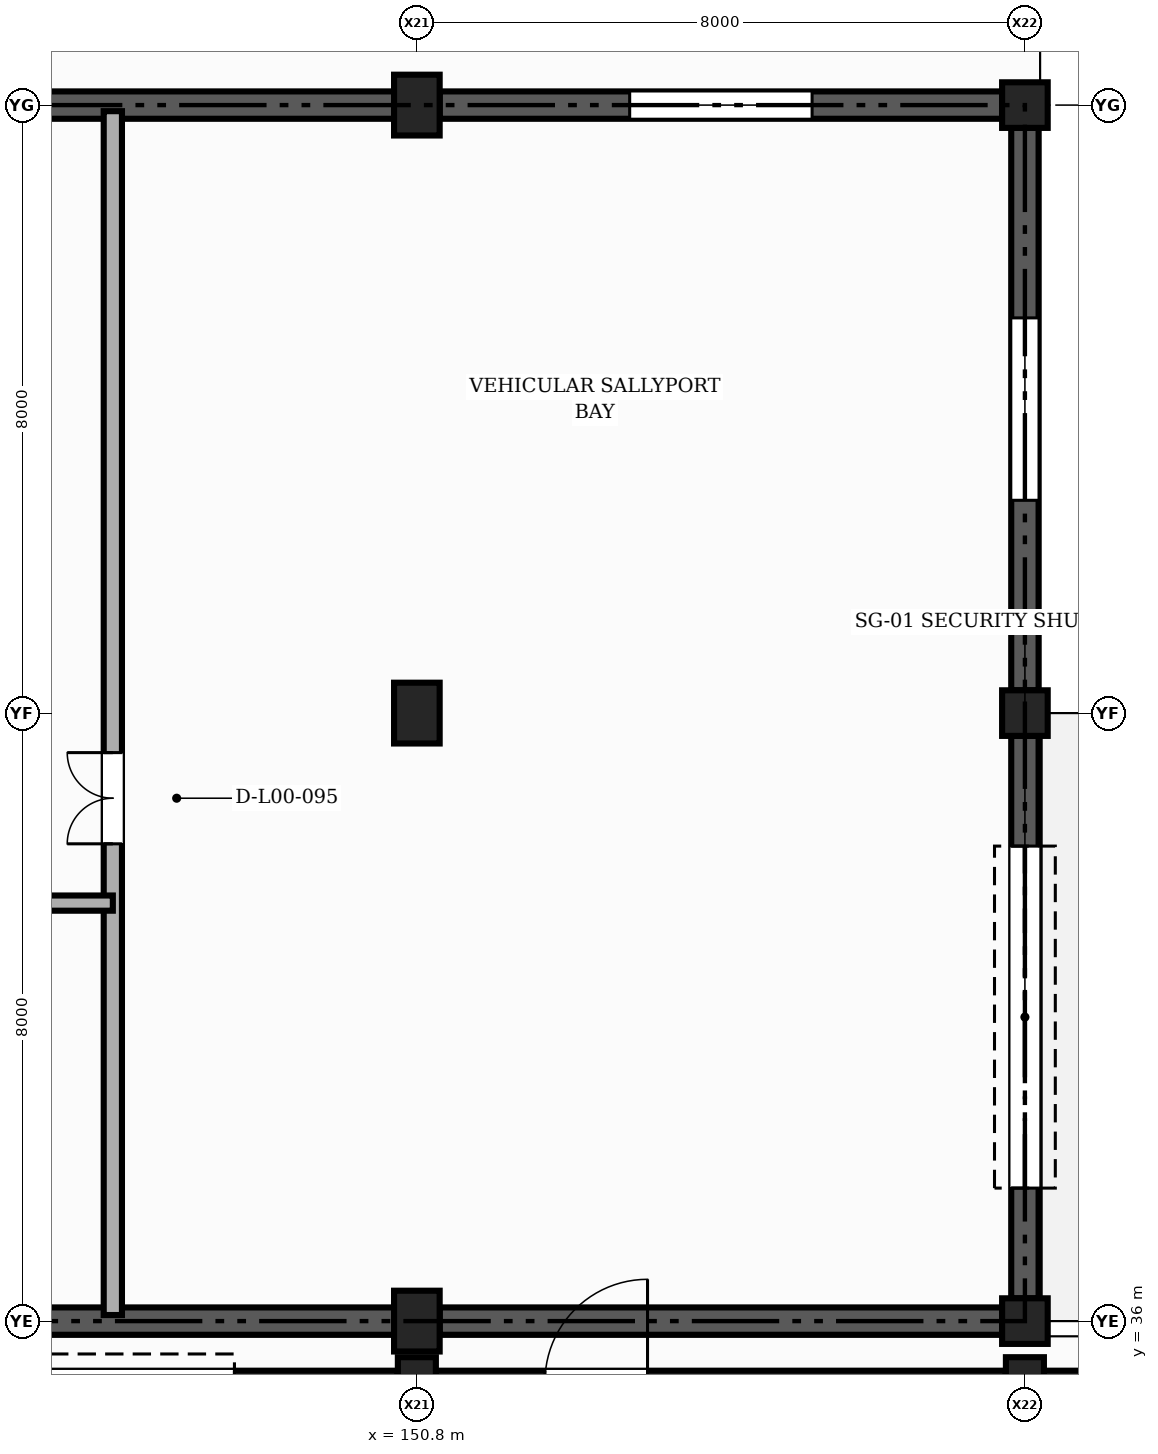
"""IFC4 building model, lengths in metres.
Left out: names, types, materials, properties, quantities, classifications, styles, units other than length and angle.
Written with IfcOpenShell. Run it as: python <this file> out.ifc"""

import sys

from ifc_helpers import new_model, si_unit, direction, frame, frame_2d, origin, origin_2d, place, context, subcontext, project, spatial, rectangle, extrude, element, fill, save


model = new_model("IFC4")
c1 = context("Model", 3, precision=1e-05, world=origin(), true_north=direction((0.0, 1.0)))
c2 = subcontext(c1, "Body", "Model", "MODEL_VIEW")
j1 = project(units=[si_unit("LENGTHUNIT", "METRE"), si_unit("PLANEANGLEUNIT", "RADIAN")], contexts=[c1])
p1 = place(None, origin())
s1 = spatial("IfcSite", under=j1, at=p1, CompositionType="ELEMENT")
p2 = place(p1, origin())
s2 = spatial("IfcBuilding", under=s1, at=p2, CompositionType="ELEMENT")
p3 = place(p2, origin())
s3 = spatial("IfcBuildingStorey", under=s2, at=p3, CompositionType="ELEMENT", Elevation=0.0)
p4 = place(p3, frame((150.8, 35.2, -0.5), z_axis=(0.0, 0.0, 1.0), x_axis=(1.0, 0.0, 0.0)))
e1 = element("IfcColumn", 1, at=p4, inside=s3, PredefinedType="COLUMN", context=c2, shape_type="SweptSolid", body=[
    extrude(rectangle(XDim=0.5, YDim=0.65, at=origin_2d()), origin(), (0.0, 0.0, 1.0), 5.3),
])
for number, where, z_axis, x_axis in (
    (2, (150.8, 36.0, -0.5), (0.0, 0.0, 1.0), (1.0, 0.0, 0.0)),
    (3, (150.8, 44.0, -0.5), (0.0, 0.0, 1.0), (1.0, 0.0, 0.0)),
    (4, (150.8, 52.0, -0.5), (0.0, 0.0, 1.0), (1.0, 0.0, 0.0)),
):
    element("IfcColumn", number, at=place(p3, frame(where, z_axis=z_axis, x_axis=x_axis)), inside=s3, PredefinedType="COLUMN", context=c2, shape_type="SweptSolid", body=[
        extrude(rectangle(XDim=0.6, YDim=0.8, at=origin_2d()), origin(), (0.0, 0.0, 1.0), 5.3),
    ])
p5 = place(p3, frame((158.8, 35.2, -0.5), z_axis=(0.0, 0.0, 1.0), x_axis=(1.0, 0.0, 0.0)))
e5 = element("IfcColumn", 5, at=p5, inside=s3, PredefinedType="COLUMN", context=c2, shape_type="SweptSolid", body=[
    extrude(rectangle(XDim=0.5, YDim=0.65, at=origin_2d()), origin(), (0.0, 0.0, 1.0), 5.3),
])
for number, where, z_axis, x_axis in (
    (6, (158.8, 36.0, -0.5), (0.0, 0.0, 1.0), (1.0, 0.0, 0.0)),
    (7, (158.8, 44.0, -0.5), (0.0, 0.0, 1.0), (1.0, 0.0, 0.0)),
    (8, (158.8, 52.0, -0.5), (0.0, 0.0, 1.0), (1.0, 0.0, 0.0)),
):
    element("IfcColumn", number, at=place(p3, frame(where, z_axis=z_axis, x_axis=x_axis)), inside=s3, PredefinedType="COLUMN", context=c2, shape_type="SweptSolid", body=[
        extrude(rectangle(XDim=0.6, YDim=0.6, at=origin_2d()), origin(), (0.0, 0.0, 1.0), 5.3),
    ])
p6 = place(p3, frame((166.55, 35.2, -0.42), z_axis=(0.0, 0.0, 1.0), x_axis=(-1.0, 0.0, 0.0)))
e9 = element("IfcWall", 9, at=p6, inside=s3, PredefinedType="SOLIDWALL", context=c2, shape_type="SweptSolid", body=[
    extrude(rectangle(XDim=7.5, YDim=0.295, at=frame_2d((3.75, 0.0))), origin(), (0.0, 0.0, 1.0), 4.333),
])
p7 = place(p6, frame((1.95, 0.0, 2.47)))
e10 = element("IfcOpeningElement", 10, at=p7, cuts=e9, PredefinedType="OPENING", context=c2, shape_type="SweptSolid", body=[
    extrude(rectangle(XDim=3.6, YDim=1.2, at=frame_2d((1.8, 0.6))), frame((0.0, 0.157, 0.0), z_axis=(0.0, -1.0, 0.0), x_axis=(1.0, 0.0, 0.0)), (0.0, 0.0, 1.0), 0.315),
])
p8 = place(p3, frame((158.55, 35.2, -0.42), z_axis=(0.0, 0.0, 1.0), x_axis=(-1.0, 0.0, 0.0)))
e11 = element("IfcWall", 11, at=p8, inside=s3, PredefinedType="SOLIDWALL", context=c2, shape_type="SweptSolid", body=[
    extrude(rectangle(XDim=7.5, YDim=0.295, at=frame_2d((3.75, 0.0))), origin(), (0.0, 0.0, 1.0), 4.95),
])
p9 = place(p8, frame((4.715, 0.0, 0.42)))
e12 = element("IfcOpeningElement", 12, at=p9, cuts=e11, PredefinedType="OPENING", context=c2, shape_type="SweptSolid", body=[
    extrude(rectangle(XDim=1.35, YDim=2.15, at=frame_2d((0.675, 1.075))), frame((0.0, 0.157, 0.0), z_axis=(0.0, -1.0, 0.0), x_axis=(1.0, 0.0, 0.0)), (0.0, 0.0, 1.0), 0.315),
])
p10 = place(p3, frame((150.55, 35.2, -0.42), z_axis=(0.0, 0.0, 1.0), x_axis=(-1.0, 0.0, 0.0)))
e13 = element("IfcWall", 13, at=p10, inside=s3, PredefinedType="SOLIDWALL", context=c2, shape_type="SweptSolid", body=[
    extrude(rectangle(XDim=7.5, YDim=0.295, at=frame_2d((3.75, 0.0))), origin(), (0.0, 0.0, 1.0), 4.333),
])
p11 = place(p10, frame((2.15, 0.0, 0.42)))
e14 = element("IfcOpeningElement", 14, at=p11, cuts=e13, PredefinedType="OPENING", context=c2, shape_type="SweptSolid", body=[
    extrude(rectangle(XDim=3.2, YDim=2.8, at=frame_2d((1.6, 1.4))), frame((0.0, 0.157, 0.0), z_axis=(0.0, -1.0, 0.0), x_axis=(1.0, 0.0, 0.0)), (0.0, 0.0, 1.0), 0.315),
])
for number, where, z_axis, x_axis in (
    (15, (143.1, 36.0, -0.42), (0.0, 0.0, 1.0), (1.0, 0.0, 0.0)),
    (16, (151.1, 36.0, -0.42), (0.0, 0.0, 1.0), (1.0, 0.0, 0.0)),
):
    element("IfcWall", number, at=place(p3, frame(where, z_axis=z_axis, x_axis=x_axis)), inside=s3, PredefinedType="SOLIDWALL", context=c2, shape_type="SweptSolid", body=[
        extrude(rectangle(XDim=7.4, YDim=0.36, at=frame_2d((3.7, 0.0))), origin(), (0.0, 0.0, 1.0), 4.13),
    ])
p12 = place(p3, frame((158.8, 36.3, -0.42), z_axis=(0.0, 0.0, 1.0), x_axis=(0.0, 1.0, 0.0)))
e17 = element("IfcWall", 17, at=p12, inside=s3, PredefinedType="SOLIDWALL", context=c2, shape_type="SweptSolid", body=[
    extrude(rectangle(XDim=7.4, YDim=0.36, at=frame_2d((3.7, 0.0))), origin(), (0.0, 0.0, 1.0), 4.23),
])
p13 = place(p12, frame((1.45, 0.0, 0.42)))
e18 = element("IfcOpeningElement", 18, at=p13, cuts=e17, PredefinedType="OPENING", context=c2, shape_type="SweptSolid", body=[
    extrude(rectangle(XDim=4.5, YDim=3.5, at=frame_2d((2.25, 1.75))), frame((0.0, 0.19, 0.0), z_axis=(0.0, -1.0, 0.0), x_axis=(1.0, 0.0, 0.0)), (0.0, 0.0, 1.0), 0.38),
])
p14 = place(p3, frame((158.8, 44.3, -0.42), z_axis=(0.0, 0.0, 1.0), x_axis=(0.0, 1.0, 0.0)))
e19 = element("IfcWall", 19, at=p14, inside=s3, PredefinedType="SOLIDWALL", context=c2, shape_type="SweptSolid", body=[
    extrude(rectangle(XDim=7.4, YDim=0.36, at=frame_2d((3.7, 0.0))), origin(), (0.0, 0.0, 1.0), 4.23),
])
p15 = place(p14, frame((2.5, 0.0, 2.52)))
e20 = element("IfcOpeningElement", 20, at=p15, cuts=e19, PredefinedType="OPENING", context=c2, shape_type="SweptSolid", body=[
    extrude(rectangle(XDim=2.4, YDim=0.75, at=frame_2d((1.2, 0.375))), frame((0.0, 0.19, 0.0), z_axis=(0.0, -1.0, 0.0), x_axis=(1.0, 0.0, 0.0)), (0.0, 0.0, 1.0), 0.38),
])
p16 = place(p3, frame((158.5, 52.0, -0.42), z_axis=(0.0, 0.0, 1.0), x_axis=(-1.0, 0.0, 0.0)))
e21 = element("IfcWall", 21, at=p16, inside=s3, PredefinedType="SOLIDWALL", context=c2, shape_type="SweptSolid", body=[
    extrude(rectangle(XDim=7.4, YDim=0.36, at=frame_2d((3.7, 0.0))), origin(), (0.0, 0.0, 1.0), 4.13),
])
p17 = place(p16, frame((2.5, 0.0, 2.52)))
e22 = element("IfcOpeningElement", 22, at=p17, cuts=e21, PredefinedType="OPENING", context=c2, shape_type="SweptSolid", body=[
    extrude(rectangle(XDim=2.4, YDim=0.75, at=frame_2d((1.2, 0.375))), frame((0.0, 0.19, 0.0), z_axis=(0.0, -1.0, 0.0), x_axis=(1.0, 0.0, 0.0)), (0.0, 0.0, 1.0), 0.38),
])
p18 = place(p3, frame((150.5, 52.0, -0.42), z_axis=(0.0, 0.0, 1.0), x_axis=(-1.0, 0.0, 0.0)))
e23 = element("IfcWall", 23, at=p18, inside=s3, PredefinedType="SOLIDWALL", context=c2, shape_type="SweptSolid", body=[
    extrude(rectangle(XDim=7.4, YDim=0.36, at=frame_2d((3.7, 0.0))), origin(), (0.0, 0.0, 1.0), 4.13),
])
p19 = place(p3, frame((146.8, 36.08, 0.0), z_axis=(0.0, 0.0, 1.0), x_axis=(0.0, 1.0, 0.0)))
e24 = element("IfcWall", 24, at=p19, inside=s3, PredefinedType="PARTITIONING", context=c2, shape_type="SweptSolid", body=[
    extrude(rectangle(XDim=15.84, YDim=0.24, at=frame_2d((7.92, 0.0))), origin(), (0.0, 0.0, 1.0), 3.695),
])
p20 = place(p19, frame((6.2, 0.0, 0.0)))
e25 = element("IfcOpeningElement", 25, at=p20, cuts=e24, PredefinedType="OPENING", context=c2, shape_type="SweptSolid", body=[
    extrude(rectangle(XDim=1.2, YDim=2.15, at=frame_2d((0.6, 1.075))), frame((0.0, 0.13, 0.0), z_axis=(0.0, -1.0, 0.0), x_axis=(1.0, 0.0, 0.0)), (0.0, 0.0, 1.0), 0.26),
])
p21 = place(p3, frame((102.88, 41.5, 0.0), z_axis=(0.0, 0.0, 1.0), x_axis=(1.0, 0.0, 0.0)))
e26 = element("IfcWall", 26, at=p21, inside=s3, PredefinedType="PARTITIONING", context=c2, shape_type="SweptSolid", body=[
    extrude(rectangle(XDim=43.92, YDim=0.2, at=frame_2d((21.96, 0.0))), origin(), (0.0, 0.0, 1.0), 3.695),
])
p22 = place(p21, frame((3.5, 0.0, 0.0)))
e27 = element("IfcOpeningElement", 27, at=p22, cuts=e26, PredefinedType="OPENING", context=c2, shape_type="SweptSolid", body=[
    extrude(rectangle(XDim=0.95, YDim=2.15, at=frame_2d((0.475, 1.075))), frame((0.0, 0.11, 0.0), z_axis=(0.0, -1.0, 0.0), x_axis=(1.0, 0.0, 0.0)), (0.0, 0.0, 1.0), 0.22),
])
p23 = place(p21, frame((13.0, 0.0, 0.0)))
e28 = element("IfcOpeningElement", 28, at=p23, cuts=e26, PredefinedType="OPENING", context=c2, shape_type="SweptSolid", body=[
    extrude(rectangle(XDim=0.95, YDim=2.2, at=frame_2d((0.475, 1.1))), frame((0.0, 0.11, 0.0), z_axis=(0.0, -1.0, 0.0), x_axis=(1.0, 0.0, 0.0)), (0.0, 0.0, 1.0), 0.22),
])
p24 = place(p21, frame((25.0, 0.0, 0.0)))
e29 = element("IfcOpeningElement", 29, at=p24, cuts=e26, PredefinedType="OPENING", context=c2, shape_type="SweptSolid", body=[
    extrude(rectangle(XDim=0.95, YDim=2.2, at=frame_2d((0.475, 1.1))), frame((0.0, 0.11, 0.0), z_axis=(0.0, -1.0, 0.0), x_axis=(1.0, 0.0, 0.0)), (0.0, 0.0, 1.0), 0.22),
])
p25 = place(p21, frame((37.0, 0.0, 0.0)))
e30 = element("IfcOpeningElement", 30, at=p25, cuts=e26, PredefinedType="OPENING", context=c2, shape_type="SweptSolid", body=[
    extrude(rectangle(XDim=0.95, YDim=2.2, at=frame_2d((0.475, 1.1))), frame((0.0, 0.11, 0.0), z_axis=(0.0, -1.0, 0.0), x_axis=(1.0, 0.0, 0.0)), (0.0, 0.0, 1.0), 0.22),
])
p26 = place(p13, frame((4.5, 0.0, 0.0), z_axis=(0.0, 0.0, 1.0), x_axis=(-1.0, 0.0, 0.0)))
e31 = element("IfcDoor", 31, at=p26, inside=s3, OperationType="ROLLINGUP", PredefinedType="GATE", context=c2, shape_type="SweptSolid", body=[
    extrude(rectangle(XDim=4.5, YDim=3.5, at=frame_2d((2.25, 1.75))), frame((0.0, 0.025, 0.0), z_axis=(0.0, -1.0, 0.0), x_axis=(1.0, 0.0, 0.0)), (0.0, 0.0, 1.0), 0.05),
])
fill(e18, e31)
p27 = place(p15, origin())
e32 = element("IfcWindow", 32, at=p27, inside=s3, PartitioningType="SINGLE_PANEL", PredefinedType="WINDOW", context=c2, shape_type="SweptSolid", body=[
    extrude(rectangle(XDim=2.4, YDim=0.75, at=frame_2d((1.2, 0.375))), frame((0.0, 0.03, 0.0), z_axis=(0.0, -1.0, 0.0), x_axis=(1.0, 0.0, 0.0)), (0.0, 0.0, 1.0), 0.06),
])
fill(e20, e32)
p28 = place(p17, origin())
e33 = element("IfcWindow", 33, at=p28, inside=s3, PartitioningType="SINGLE_PANEL", PredefinedType="WINDOW", context=c2, shape_type="SweptSolid", body=[
    extrude(rectangle(XDim=2.4, YDim=0.75, at=frame_2d((1.2, 0.375))), frame((0.0, 0.03, 0.0), z_axis=(0.0, -1.0, 0.0), x_axis=(1.0, 0.0, 0.0)), (0.0, 0.0, 1.0), 0.06),
])
fill(e22, e33)
p29 = place(p20, origin())
e34 = element("IfcDoor", 34, at=p29, inside=s3, OperationType="DOUBLE_DOOR_SINGLE_SWING", PredefinedType="DOOR", context=c2, shape_type="SweptSolid", body=[
    extrude(rectangle(XDim=1.2, YDim=2.15, at=frame_2d((0.6, 1.075))), frame((0.0, 0.025, 0.0), z_axis=(0.0, -1.0, 0.0), x_axis=(1.0, 0.0, 0.0)), (0.0, 0.0, 1.0), 0.05),
])
fill(e25, e34)
save(model, sys.argv[1])
